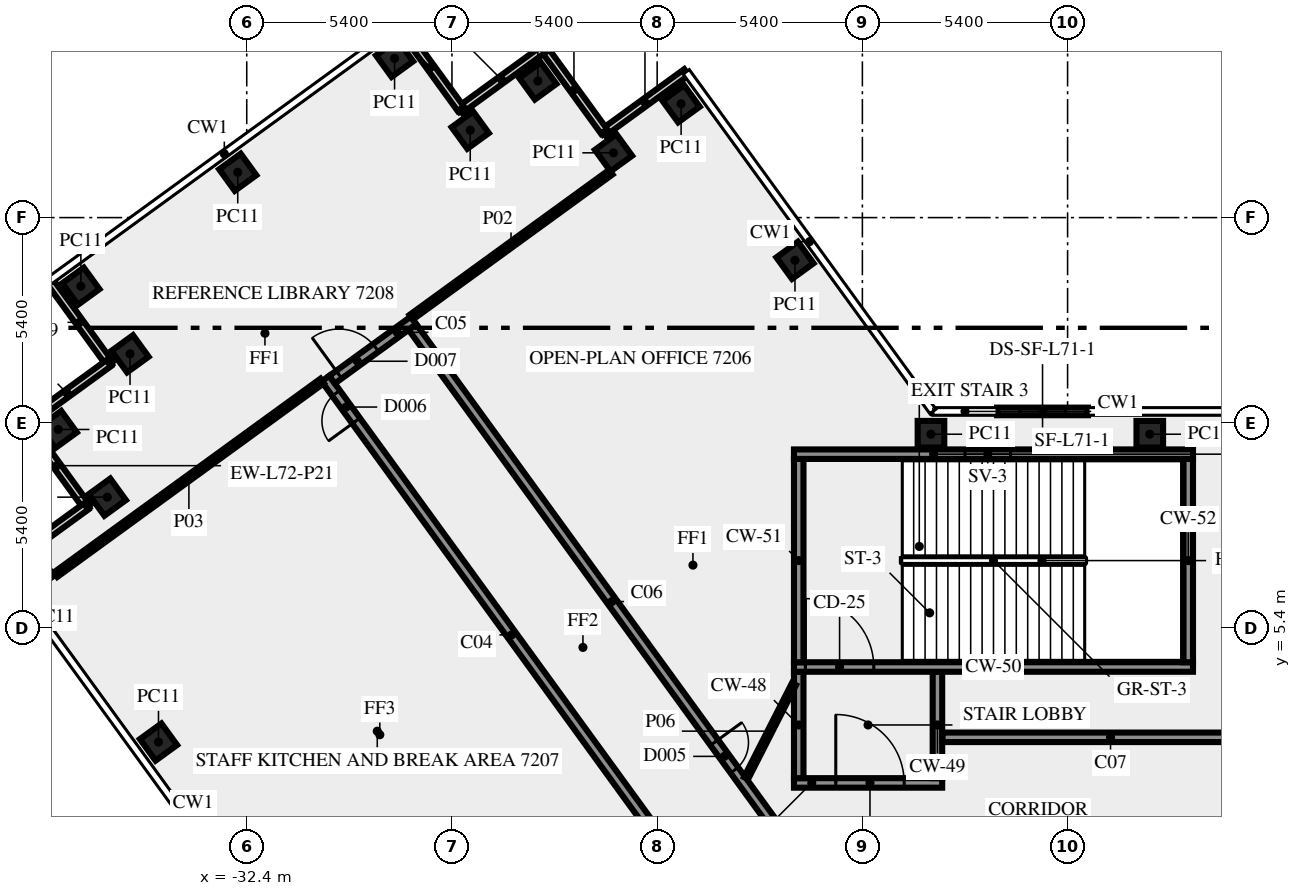
"""IFC4 building model, lengths in metres.
Left out: names, types, materials, properties, quantities, classifications, styles, units other than length and angle.
Written with IfcOpenShell. Run it as: python <this file> out.ifc"""

import sys

from ifc_helpers import new_model, si_unit, direction, frame, frame_2d, origin, origin_2d, place, context, subcontext, project, spatial, rectangle, extrude, element, fill, save


model = new_model("IFC4")
c1 = context("Model", 3, precision=1e-05, world=origin(), true_north=direction((0.0, 1.0)))
c2 = subcontext(c1, "Body", "Model", "MODEL_VIEW")
j1 = project(units=[si_unit("LENGTHUNIT", "METRE"), si_unit("PLANEANGLEUNIT", "RADIAN")], contexts=[c1])
p1 = place(None, origin())
s1 = spatial("IfcSite", under=j1, at=p1, CompositionType="ELEMENT")
p2 = place(p1, origin())
s2 = spatial("IfcBuilding", under=s1, at=p2, CompositionType="ELEMENT")
p3 = place(p2, frame((0.0, 0.0, 311.0)))
s3 = spatial("IfcBuildingStorey", under=s2, at=p3, CompositionType="ELEMENT", Elevation=311.0)
for number, where, z_axis, x_axis in (
    (1, (-17.974, 15.075, 0.0), (0.0, 0.0, 1.0), (-0.588, 0.809, 0.0)),
    (2, (-20.97, 19.195, 0.0), (0.0, 0.0, 1.0), (-0.588, 0.809, 0.0)),
    (3, (-22.749, 17.904, 0.0), (0.0, 0.0, 1.0), (-0.588, 0.809, 0.0)),
    (4, (-24.74, 19.795, 0.0), (0.0, 0.0, 1.0), (-0.588, 0.809, 0.0)),
    (5, (-26.519, 18.5, 0.0), (0.0, 0.0, 1.0), (-0.588, 0.809, 0.0)),
    (6, (-28.51, 20.39, 0.0), (0.0, 0.0, 1.0), (-0.809, -0.588, 0.0)),
    (7, (-32.637, 17.393, 0.0), (0.0, 0.0, 1.0), (-0.809, -0.588, 0.0)),
    (8, (-36.765, 14.395, 0.0), (0.0, 0.0, 1.0), (0.588, -0.809, 0.0)),
    (9, (-35.471, 12.616, 0.0), (0.0, 0.0, 1.0), (-0.809, -0.588, 0.0)),
    (10, (-37.36, 10.625, 0.0), (0.0, 0.0, 1.0), (0.588, -0.809, 0.0)),
    (11, (-36.068, 8.844, 0.0), (0.0, 0.0, 1.0), (0.588, -0.809, 0.0)),
    (12, (-37.96, 6.855, 0.0), (0.0, 0.0, 1.0), (0.588, -0.809, 0.0)),
    (13, (-34.722, 2.4, 0.0), (0.0, 0.0, 1.0), (0.588, -0.809, 0.0)),
    (14, (-8.637, 10.5, 0.0), (0.0, 0.0, 1.0), (-1.0, 0.0, 0.0)),
    (15, (-14.395, 10.5, 0.0), (0.0, 0.0, 1.0), (-1.0, 0.0, 0.0)),
):
    element("IfcColumn", number, at=place(p3, frame(where, z_axis=z_axis, x_axis=x_axis)), inside=s3, PredefinedType="COLUMN", context=c2, shape_type="SweptSolid", body=[
        extrude(rectangle(XDim=0.7, YDim=0.7, at=origin_2d()), origin(), (0.0, 0.0, 1.0), 3.65),
    ])
p4 = place(p3, frame((-10.263, 11.1, 0.0), z_axis=(0.0, 0.0, 1.0), x_axis=(-1.0, 0.0, 0.0)))
e16 = element("IfcWall", 16, at=p4, inside=s3, PredefinedType="SOLIDWALL", context=c2, shape_type="SweptSolid", body=[
    extrude(rectangle(XDim=2.392, YDim=0.2, at=frame_2d((1.196, 0.0))), origin(), (0.0, 0.0, 1.0), 3.65),
])
p5 = place(p4, frame((0.596, 0.0, 1.0)))
e17 = element("IfcOpeningElement", 17, at=p5, cuts=e16, PredefinedType="OPENING", context=c2, shape_type="SweptSolid", body=[
    extrude(rectangle(XDim=1.2, YDim=1.2, at=frame_2d((0.6, 0.6))), frame((0.0, 0.11, 0.0), z_axis=(0.0, -1.0, 0.0), x_axis=(1.0, 0.0, 0.0)), (0.0, 0.0, 1.0), 0.22),
])
for number, where, z_axis, x_axis in (
    (18, (-20.829, 20.025, 0.0), (0.0, 0.0, 1.0), (-0.809, -0.588, 0.0)),
    (19, (-22.996, 18.466, 0.0), (0.0, 0.0, 1.0), (-0.588, 0.809, 0.0)),
):
    element("IfcWall", number, at=place(p3, frame(where, z_axis=z_axis, x_axis=x_axis)), inside=s3, PredefinedType="SOLIDWALL", context=c2, shape_type="SweptSolid", body=[
        extrude(rectangle(XDim=2.7, YDim=0.2, at=frame_2d((1.35, 0.0))), origin(), (0.0, 0.0, 1.0), 3.65),
    ])
for number, where, z_axis, x_axis in (
    (20, (-24.6, 20.623, 0.0), (0.0, 0.0, 1.0), (-0.809, -0.588, 0.0)),
    (21, (-26.768, 19.063, 0.0), (0.0, 0.0, 1.0), (-0.588, 0.809, 0.0)),
):
    element("IfcWall", number, at=place(p3, frame(where, z_axis=z_axis, x_axis=x_axis)), inside=s3, PredefinedType="SOLIDWALL", context=c2, shape_type="SweptSolid", body=[
        extrude(rectangle(XDim=2.7, YDim=0.2, at=frame_2d((1.35, 0.0))), origin(), (0.0, 0.0, 1.0), 3.65),
    ])
for number, where, z_axis, x_axis in (
    (22, (-37.592, 14.536, 0.0), (0.0, 0.0, 1.0), (0.588, -0.809, 0.0)),
    (23, (-36.032, 12.369, 0.0), (0.0, 0.0, 1.0), (-0.809, -0.588, 0.0)),
    (24, (-38.189, 10.765, 0.0), (0.0, 0.0, 1.0), (0.588, -0.809, 0.0)),
    (25, (-36.629, 8.597, 0.0), (0.0, 0.0, 1.0), (-0.809, -0.588, 0.0)),
):
    element("IfcWall", number, at=place(p3, frame(where, z_axis=z_axis, x_axis=x_axis)), inside=s3, PredefinedType="SOLIDWALL", context=c2, shape_type="SweptSolid", body=[
        extrude(rectangle(XDim=2.7, YDim=0.2, at=frame_2d((1.35, 0.0))), origin(), (0.0, 0.0, 1.0), 3.65),
    ])
p6 = place(p3, frame((-18.0, 1.325, 0.0), z_axis=(0.0, 0.0, 1.0), x_axis=(1.0, 0.0, 0.0)))
e26 = element("IfcWall", 26, at=p6, inside=s3, PredefinedType="SHEAR", context=c2, shape_type="SweptSolid", body=[
    extrude(rectangle(XDim=3.9, YDim=0.25, at=frame_2d((1.95, 0.0))), origin(), (0.0, 0.0, 1.0), 3.65),
])
p7 = place(p6, frame((1.1, 0.0, 0.0)))
e27 = element("IfcOpeningElement", 27, at=p7, cuts=e26, PredefinedType="OPENING", context=c2, shape_type="SweptSolid", body=[
    extrude(rectangle(XDim=1.8, YDim=2.1, at=frame_2d((0.9, 1.05))), frame((0.0, 0.135, 0.0), z_axis=(0.0, -1.0, 0.0), x_axis=(1.0, 0.0, 0.0)), (0.0, 0.0, 1.0), 0.27),
])
for number, where, z_axis, x_axis in (
    (28, (-17.875, 1.45, 0.0), (0.0, 0.0, 1.0), (0.0, 1.0, 0.0)),
    (29, (-14.225, 1.45, 0.0), (0.0, 0.0, 1.0), (0.0, 1.0, 0.0)),
):
    element("IfcWall", number, at=place(p3, frame(where, z_axis=z_axis, x_axis=x_axis)), inside=s3, PredefinedType="SHEAR", context=c2, shape_type="SweptSolid", body=[
        extrude(rectangle(XDim=2.8, YDim=0.25, at=frame_2d((1.4, 0.0))), origin(), (0.0, 0.0, 1.0), 3.65),
    ])
p8 = place(p3, frame((-18.0, 4.375, 0.0), z_axis=(0.0, 0.0, 1.0), x_axis=(1.0, 0.0, 0.0)))
e30 = element("IfcWall", 30, at=p8, inside=s3, PredefinedType="SHEAR", context=c2, shape_type="SweptSolid", body=[
    extrude(rectangle(XDim=10.5, YDim=0.25, at=frame_2d((5.25, 0.0))), origin(), (0.0, 0.0, 1.0), 3.65),
])
p9 = place(p8, frame((0.3, 0.0, 0.0)))
e31 = element("IfcOpeningElement", 31, at=p9, cuts=e30, PredefinedType="OPENING", context=c2, shape_type="SweptSolid", body=[
    extrude(rectangle(XDim=1.8, YDim=2.1, at=frame_2d((0.9, 1.05))), frame((0.0, 0.135, 0.0), z_axis=(0.0, -1.0, 0.0), x_axis=(1.0, 0.0, 0.0)), (0.0, 0.0, 1.0), 0.27),
])
for number, where, z_axis, x_axis in (
    (32, (-17.875, 4.5, 0.0), (0.0, 0.0, 1.0), (0.0, 1.0, 0.0)),
    (33, (-7.625, 4.5, 0.0), (0.0, 0.0, 1.0), (0.0, 1.0, 0.0)),
):
    element("IfcWall", number, at=place(p3, frame(where, z_axis=z_axis, x_axis=x_axis)), inside=s3, PredefinedType="SHEAR", context=c2, shape_type="SweptSolid", body=[
        extrude(rectangle(XDim=5.35, YDim=0.25, at=frame_2d((2.675, 0.0))), origin(), (0.0, 0.0, 1.0), 3.65),
    ])
p10 = place(p3, frame((-18.0, 9.975, 0.0), z_axis=(0.0, 0.0, 1.0), x_axis=(1.0, 0.0, 0.0)))
e34 = element("IfcWall", 34, at=p10, inside=s3, PredefinedType="SHEAR", context=c2, shape_type="SweptSolid", body=[
    extrude(rectangle(XDim=10.5, YDim=0.25, at=frame_2d((5.25, 0.0))), origin(), (0.0, 0.0, 1.0), 3.65),
])
p11 = place(p10, frame((4.5, 0.0, 1.0)))
e35 = element("IfcOpeningElement", 35, at=p11, cuts=e34, PredefinedType="OPENING", context=c2, shape_type="SweptSolid", body=[
    extrude(rectangle(XDim=1.2, YDim=1.2, at=frame_2d((0.6, 0.6))), frame((0.0, 0.135, 0.0), z_axis=(0.0, -1.0, 0.0), x_axis=(1.0, 0.0, 0.0)), (0.0, 0.0, 1.0), 0.27),
])
p12 = place(p3, frame((-20.531, -1.523, 0.0), z_axis=(0.0, 0.0, 1.0), x_axis=(-0.587785867777, 0.809016547199, 0.0)))
e36 = element("IfcWall", 36, at=p12, inside=s3, PredefinedType="SOLIDWALL", context=c2, shape_type="SweptSolid", body=[
    extrude(rectangle(XDim=16.67, YDim=0.25, at=frame_2d((8.335, 0.0))), origin(), (0.0, 0.0, 1.0), 3.65),
])
p13 = place(p12, frame((15.296, 0.0, 0.0)))
e37 = element("IfcOpeningElement", 37, at=p13, cuts=e36, PredefinedType="OPENING", context=c2, shape_type="SweptSolid", body=[
    extrude(rectangle(XDim=0.9, YDim=2.1, at=frame_2d((0.45, 1.05))), frame((0.0, 0.135, 0.0), z_axis=(0.0, -1.0, 0.0), x_axis=(1.0, 0.0, 0.0)), (0.0, 0.0, 1.0), 0.27),
])
p14 = place(p3, frame((-30.155, 11.936, 0.0), z_axis=(0.0, 0.0, 1.0), x_axis=(0.809038743598, 0.587755315891, 0.0)))
e38 = element("IfcWall", 38, at=p14, inside=s3, PredefinedType="SOLIDWALL", context=c2, shape_type="SweptSolid", body=[
    extrude(rectangle(XDim=2.65, YDim=0.25, at=frame_2d((1.325, 0.0))), origin(), (0.0, 0.0, 1.0), 3.65),
])
p15 = place(p14, frame((0.225, 0.0, 0.0)))
e39 = element("IfcOpeningElement", 39, at=p15, cuts=e38, PredefinedType="OPENING", context=c2, shape_type="SweptSolid", body=[
    extrude(rectangle(XDim=1.2, YDim=2.1, at=frame_2d((0.6, 1.05))), frame((0.0, 0.135, 0.0), z_axis=(0.0, -1.0, 0.0), x_axis=(1.0, 0.0, 0.0)), (0.0, 0.0, 1.0), 0.27),
])
p16 = place(p3, frame((-28.039, 13.319, 0.0), z_axis=(0.0, 0.0, 1.0), x_axis=(0.587791911753, -0.809012155952, 0.0)))
e40 = element("IfcWall", 40, at=p16, inside=s3, PredefinedType="SOLIDWALL", context=c2, shape_type="SweptSolid", body=[
    extrude(rectangle(XDim=17.853, YDim=0.25, at=frame_2d((8.927, 0.0))), origin(), (0.0, 0.0, 1.0), 3.65),
])
p17 = place(p16, frame((13.512, 0.0, 0.0)))
e41 = element("IfcOpeningElement", 41, at=p17, cuts=e40, PredefinedType="OPENING", context=c2, shape_type="SweptSolid", body=[
    extrude(rectangle(XDim=0.9, YDim=2.1, at=frame_2d((0.45, 1.05))), frame((0.0, 0.135, 0.0), z_axis=(0.0, -1.0, 0.0), x_axis=(1.0, 0.0, 0.0)), (0.0, 0.0, 1.0), 0.27),
])
p18 = place(p3, frame((-14.09, 2.525, 0.0), z_axis=(0.0, 0.0, 1.0), x_axis=(1.0, 0.0, 0.0)))
e42 = element("IfcWall", 42, at=p18, inside=s3, PredefinedType="SOLIDWALL", context=c2, shape_type="SweptSolid", body=[
    extrude(rectangle(XDim=8.84, YDim=0.25, at=frame_2d((4.42, 0.0))), origin(), (0.0, 0.0, 1.0), 3.65),
])
p19 = place(p3, frame((-22.818, 17.396, 0.0), z_axis=(0.0, 0.0, 1.0), x_axis=(-0.809000932727, -0.587807358619, 0.0)))
e43 = element("IfcWall", 43, at=p19, inside=s3, PredefinedType="PARTITIONING", context=c2, shape_type="SweptSolid", body=[
    extrude(rectangle(XDim=6.496, YDim=0.15, at=frame_2d((3.248, 0.0))), origin(), (0.0, 0.0, 1.0), 3.65),
])
p20 = place(p3, frame((-37.429, 6.805, 0.0), z_axis=(0.0, 0.0, 1.0), x_axis=(0.809020922653, 0.587779845444, 0.0)))
e44 = element("IfcWall", 44, at=p20, inside=s3, PredefinedType="PARTITIONING", context=c2, shape_type="SweptSolid", body=[
    extrude(rectangle(XDim=8.67, YDim=0.15, at=frame_2d((4.335, 0.0))), origin(), (0.0, 0.0, 1.0), 3.65),
])
p21 = place(p3, frame((-19.261, 1.45, 0.0), z_axis=(0.0, 0.0, 1.0), x_axis=(0.453950796792, 0.891026752736, 0.0)))
e45 = element("IfcWall", 45, at=p21, inside=s3, PredefinedType="PARTITIONING", context=c2, shape_type="SweptSolid", body=[
    extrude(rectangle(XDim=2.778, YDim=0.12, at=frame_2d((1.389, 0.0))), origin(), (0.0, 0.0, 1.0), 3.65),
])
p22 = place(p5, origin())
e46 = element("IfcWindow", 46, at=p22, inside=s3, PartitioningType="SINGLE_PANEL", PredefinedType="WINDOW", context=c2, shape_type="SweptSolid", body=[
    extrude(rectangle(XDim=1.2, YDim=1.2, at=frame_2d((0.6, 0.6))), frame((0.0, 0.03, 0.0), z_axis=(0.0, -1.0, 0.0), x_axis=(1.0, 0.0, 0.0)), (0.0, 0.0, 1.0), 0.06),
])
fill(e17, e46)
p23 = place(p7, origin())
e47 = element("IfcDoor", 47, at=p23, inside=s3, OperationType="DOUBLE_DOOR_SINGLE_SWING", PredefinedType="DOOR", context=c2, shape_type="SweptSolid", body=[
    extrude(rectangle(XDim=1.8, YDim=2.1, at=frame_2d((0.9, 1.05))), frame((0.0, 0.025, 0.0), z_axis=(0.0, -1.0, 0.0), x_axis=(1.0, 0.0, 0.0)), (0.0, 0.0, 1.0), 0.05),
])
fill(e27, e47)
p24 = place(p9, origin())
e48 = element("IfcDoor", 48, at=p24, inside=s3, OperationType="DOUBLE_DOOR_SINGLE_SWING", PredefinedType="DOOR", context=c2, shape_type="SweptSolid", body=[
    extrude(rectangle(XDim=1.8, YDim=2.1, at=frame_2d((0.9, 1.05))), frame((0.0, 0.025, 0.0), z_axis=(0.0, -1.0, 0.0), x_axis=(1.0, 0.0, 0.0)), (0.0, 0.0, 1.0), 0.05),
])
fill(e31, e48)
p25 = place(p11, origin())
e49 = element("IfcWindow", 49, at=p25, inside=s3, PartitioningType="SINGLE_PANEL", PredefinedType="WINDOW", context=c2, shape_type="SweptSolid", body=[
    extrude(rectangle(XDim=1.2, YDim=1.2, at=frame_2d((0.6, 0.6))), frame((0.0, 0.03, 0.0), z_axis=(0.0, -1.0, 0.0), x_axis=(1.0, 0.0, 0.0)), (0.0, 0.0, 1.0), 0.06),
])
fill(e35, e49)
p26 = place(p17, origin())
e50 = element("IfcDoor", 50, at=p26, inside=s3, OperationType="SINGLE_SWING_RIGHT", PredefinedType="DOOR", context=c2, shape_type="SweptSolid", body=[
    extrude(rectangle(XDim=0.9, YDim=2.1, at=frame_2d((0.45, 1.05))), frame((0.0, 0.025, 0.0), z_axis=(0.0, -1.0, 0.0), x_axis=(1.0, 0.0, 0.0)), (0.0, 0.0, 1.0), 0.05),
])
fill(e41, e50)
p27 = place(p15, origin())
e51 = element("IfcDoor", 51, at=p27, inside=s3, OperationType="SINGLE_SWING_LEFT", PredefinedType="DOOR", context=c2, shape_type="SweptSolid", body=[
    extrude(rectangle(XDim=1.2, YDim=2.1, at=frame_2d((0.6, 1.05))), frame((0.0, 0.025, 0.0), z_axis=(0.0, -1.0, 0.0), x_axis=(1.0, 0.0, 0.0)), (0.0, 0.0, 1.0), 0.05),
])
fill(e39, e51)
p28 = place(p13, origin())
e52 = element("IfcDoor", 52, at=p28, inside=s3, OperationType="SINGLE_SWING_RIGHT", PredefinedType="DOOR", context=c2, shape_type="SweptSolid", body=[
    extrude(rectangle(XDim=0.9, YDim=2.1, at=frame_2d((0.45, 1.05))), frame((0.0, 0.025, 0.0), z_axis=(0.0, -1.0, 0.0), x_axis=(1.0, 0.0, 0.0)), (0.0, 0.0, 1.0), 0.05),
])
fill(e37, e52)
save(model, sys.argv[1])
